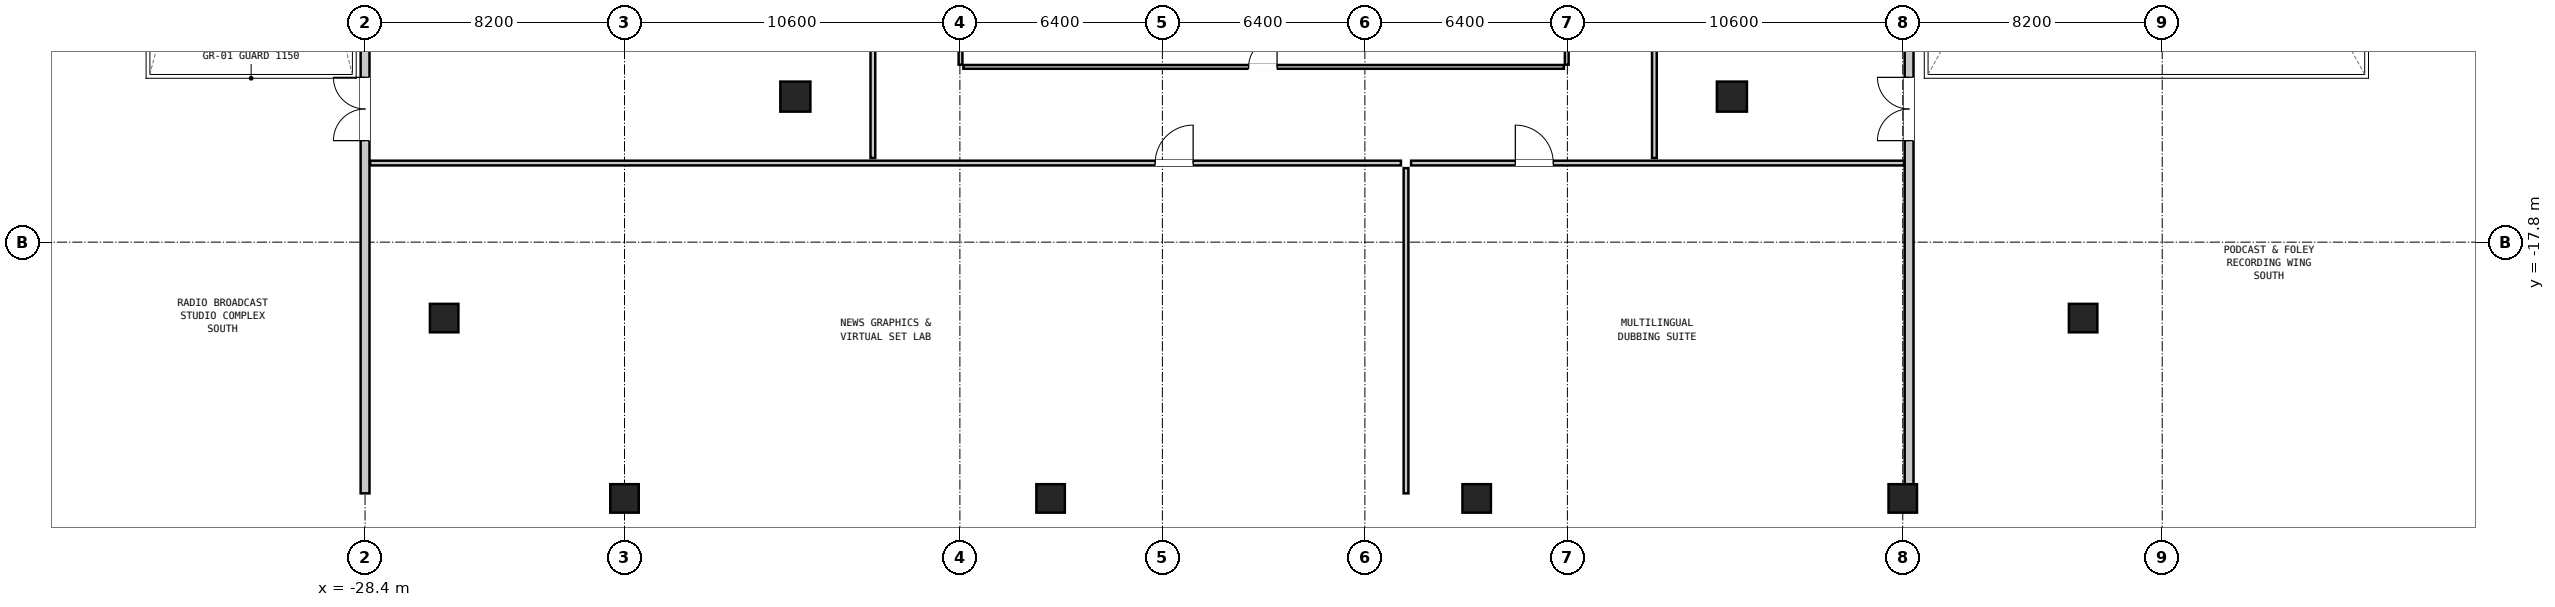
"""IFC4 building model, lengths in metres.
Left out: names, types, materials, properties, quantities, classifications, styles, units other than length and angle.
Written with IfcOpenShell. Run it as: python <this file> out.ifc"""

import sys

from ifc_helpers import new_model, si_unit, direction, frame, frame_2d, origin, origin_2d, place, context, subcontext, project, spatial, rectangle, hollow_rectangle, extrude, element, fill, save


model = new_model("IFC4")
c1 = context("Model", 3, precision=1e-05, world=origin(), true_north=direction((0.0, 1.0)))
c2 = subcontext(c1, "Body", "Model", "MODEL_VIEW")
j1 = project(units=[si_unit("LENGTHUNIT", "METRE"), si_unit("PLANEANGLEUNIT", "RADIAN")], contexts=[c1])
p1 = place(None, origin())
s1 = spatial("IfcSite", under=j1, at=p1, CompositionType="ELEMENT")
p2 = place(p1, origin())
s2 = spatial("IfcBuilding", under=s1, at=p2, CompositionType="ELEMENT")
p3 = place(p2, frame((0.0, 0.0, 17.7)))
s3 = spatial("IfcBuildingStorey", under=s2, at=p3, CompositionType="ELEMENT", Elevation=17.7)
for number, where, z_axis, x_axis in (
    (1, (-14.8, -13.2, 0.0), (0.0, 0.0, 1.0), (1.0, 0.0, 0.0)),
    (2, (14.8, -13.2, 0.0), (0.0, 0.0, 1.0), (1.0, 0.0, 0.0)),
):
    element("IfcColumn", number, at=place(p3, frame(where, z_axis=z_axis, x_axis=x_axis)), inside=s3, PredefinedType="COLUMN", context=c2, shape_type="SweptSolid", body=[
        extrude(hollow_rectangle(XDim=0.95, YDim=0.95, WallThickness=0.06, at=origin_2d()), origin(), (0.0, 0.0, 1.0), 4.2),
    ])
for number, where, z_axis, x_axis in (
    (3, (-20.2, -25.9, 0.0), (0.0, 0.0, 1.0), (1.0, 0.0, 0.0)),
    (4, (-6.733, -25.9, 0.0), (0.0, 0.0, 1.0), (1.0, 0.0, 0.0)),
    (5, (6.733, -25.9, 0.0), (0.0, 0.0, 1.0), (1.0, 0.0, 0.0)),
    (6, (20.2, -25.9, 0.0), (0.0, 0.0, 1.0), (1.0, 0.0, 0.0)),
    (7, (25.9, -20.2, 0.0), (0.0, 0.0, 1.0), (0.0, 1.0, 0.0)),
    (8, (-25.9, -20.2, 0.0), (0.0, 0.0, 1.0), (0.0, 1.0, 0.0)),
):
    element("IfcColumn", number, at=place(p3, frame(where, z_axis=z_axis, x_axis=x_axis)), inside=s3, PredefinedType="COLUMN", context=c2, shape_type="SweptSolid", body=[
        extrude(hollow_rectangle(XDim=0.9, YDim=0.9, WallThickness=0.055, at=origin_2d()), origin(), (0.0, 0.0, 1.0), 4.2),
    ])
p4 = place(p3, frame((-28.4, -25.74, 0.0), z_axis=(0.0, 0.0, 1.0), x_axis=(0.0, 1.0, 0.0)))
e9 = element("IfcWall", 9, at=p4, inside=s3, PredefinedType="MOVABLE", context=c2, shape_type="SweptSolid", body=[
    extrude(rectangle(XDim=51.48, YDim=0.28, at=frame_2d((25.74, 0.0))), origin(), (0.0, 0.0, 1.0), 3.82),
])
p5 = place(p4, frame((11.149, 0.0, 0.0)))
e10 = element("IfcOpeningElement", 10, at=p5, cuts=e9, PredefinedType="OPENING", context=c2, shape_type="SweptSolid", body=[
    extrude(rectangle(XDim=2.0, YDim=2.14, at=frame_2d((1.0, 1.07))), frame((0.0, 0.152, 0.0), z_axis=(0.0, -1.0, 0.0), x_axis=(1.0, 0.0, 0.0)), (0.0, 0.0, 1.0), 0.304),
])
p6 = place(p4, frame((38.64, 0.0, 0.0)))
e11 = element("IfcOpeningElement", 11, at=p6, cuts=e9, PredefinedType="OPENING", context=c2, shape_type="SweptSolid", body=[
    extrude(rectangle(XDim=2.0, YDim=2.14, at=frame_2d((1.0, 1.07))), frame((0.0, 0.152, 0.0), z_axis=(0.0, -1.0, 0.0), x_axis=(1.0, 0.0, 0.0)), (0.0, 0.0, 1.0), 0.304),
])
p7 = place(p3, frame((20.4, -25.74, 0.0), z_axis=(0.0, 0.0, 1.0), x_axis=(0.0, 1.0, 0.0)))
e12 = element("IfcWall", 12, at=p7, inside=s3, PredefinedType="MOVABLE", context=c2, shape_type="SweptSolid", body=[
    extrude(rectangle(XDim=51.48, YDim=0.28, at=frame_2d((25.74, 0.0))), origin(), (0.0, 0.0, 1.0), 3.193),
])
p8 = place(p7, frame((11.149, 0.0, 0.0)))
e13 = element("IfcOpeningElement", 13, at=p8, cuts=e12, PredefinedType="OPENING", context=c2, shape_type="SweptSolid", body=[
    extrude(rectangle(XDim=2.0, YDim=2.14, at=frame_2d((1.0, 1.07))), frame((0.0, 0.152, 0.0), z_axis=(0.0, -1.0, 0.0), x_axis=(1.0, 0.0, 0.0)), (0.0, 0.0, 1.0), 0.304),
])
p9 = place(p7, frame((38.64, 0.0, 0.0)))
e14 = element("IfcOpeningElement", 14, at=p9, cuts=e12, PredefinedType="OPENING", context=c2, shape_type="SweptSolid", body=[
    extrude(rectangle(XDim=2.0, YDim=2.14, at=frame_2d((1.0, 1.07))), frame((0.0, 0.152, 0.0), z_axis=(0.0, -1.0, 0.0), x_axis=(1.0, 0.0, 0.0)), (0.0, 0.0, 1.0), 0.304),
])
p10 = place(p3, frame((-28.24, -15.3, 0.0), z_axis=(0.0, 0.0, 1.0), x_axis=(1.0, 0.0, 0.0)))
e15 = element("IfcWall", 15, at=p10, inside=s3, PredefinedType="PARTITIONING", context=c2, shape_type="SweptSolid", body=[
    extrude(rectangle(XDim=32.58, YDim=0.15, at=frame_2d((16.29, 0.0))), origin(), (0.0, 0.0, 1.0), 3.82),
])
p11 = place(p10, frame((24.812, 0.0, 0.0)))
e16 = element("IfcOpeningElement", 16, at=p11, cuts=e15, PredefinedType="OPENING", context=c2, shape_type="SweptSolid", body=[
    extrude(rectangle(XDim=1.2, YDim=2.1, at=frame_2d((0.6, 1.05))), frame((0.0, 0.087, 0.0), z_axis=(0.0, -1.0, 0.0), x_axis=(1.0, 0.0, 0.0)), (0.0, 0.0, 1.0), 0.174),
])
p12 = place(p3, frame((4.66, -15.3, 0.0), z_axis=(0.0, 0.0, 1.0), x_axis=(1.0, 0.0, 0.0)))
e17 = element("IfcWall", 17, at=p12, inside=s3, PredefinedType="PARTITIONING", context=c2, shape_type="SweptSolid", body=[
    extrude(rectangle(XDim=15.58, YDim=0.15, at=frame_2d((7.79, 0.0))), origin(), (0.0, 0.0, 1.0), 3.82),
])
p13 = place(p12, frame((3.295, 0.0, 0.0)))
e18 = element("IfcOpeningElement", 18, at=p13, cuts=e17, PredefinedType="OPENING", context=c2, shape_type="SweptSolid", body=[
    extrude(rectangle(XDim=1.2, YDim=2.1, at=frame_2d((0.6, 1.05))), frame((0.0, 0.087, 0.0), z_axis=(0.0, -1.0, 0.0), x_axis=(1.0, 0.0, 0.0)), (0.0, 0.0, 1.0), 0.174),
])
p14 = place(p3, frame((4.5, -25.74, 0.0), z_axis=(0.0, 0.0, 1.0), x_axis=(0.0, 1.0, 0.0)))
e19 = element("IfcWall", 19, at=p14, inside=s3, PredefinedType="PARTITIONING", context=c2, shape_type="SweptSolid", body=[
    extrude(rectangle(XDim=10.28, YDim=0.15, at=frame_2d((5.14, 0.0))), origin(), (0.0, 0.0, 1.0), 3.82),
])
p15 = place(p3, frame((-12.35, -15.14, 0.0), z_axis=(0.0, 0.0, 1.0), x_axis=(0.0, 1.0, 0.0)))
e20 = element("IfcWall", 20, at=p15, inside=s3, PredefinedType="PARTITIONING", context=c2, shape_type="SweptSolid", body=[
    extrude(rectangle(XDim=12.58, YDim=0.15, at=frame_2d((6.29, 0.0))), origin(), (0.0, 0.0, 1.0), 3.82),
])
p16 = place(p15, frame((5.815, 0.0, 0.0)))
e21 = element("IfcOpeningElement", 21, at=p16, cuts=e20, PredefinedType="OPENING", context=c2, shape_type="SweptSolid", body=[
    extrude(rectangle(XDim=0.95, YDim=2.1, at=frame_2d((0.475, 1.05))), frame((0.0, 0.087, 0.0), z_axis=(0.0, -1.0, 0.0), x_axis=(1.0, 0.0, 0.0)), (0.0, 0.0, 1.0), 0.174),
])
p17 = place(p3, frame((12.35, -15.14, 0.0), z_axis=(0.0, 0.0, 1.0), x_axis=(0.0, 1.0, 0.0)))
e22 = element("IfcWall", 22, at=p17, inside=s3, PredefinedType="PARTITIONING", context=c2, shape_type="SweptSolid", body=[
    extrude(rectangle(XDim=12.6, YDim=0.15, at=frame_2d((6.3, 0.0))), origin(), (0.0, 0.0, 1.0), 3.82),
])
p18 = place(p17, frame((5.825, 0.0, 0.0)))
e23 = element("IfcOpeningElement", 23, at=p18, cuts=e22, PredefinedType="OPENING", context=c2, shape_type="SweptSolid", body=[
    extrude(rectangle(XDim=0.95, YDim=2.1, at=frame_2d((0.475, 1.05))), frame((0.0, 0.087, 0.0), z_axis=(0.0, -1.0, 0.0), x_axis=(1.0, 0.0, 0.0)), (0.0, 0.0, 1.0), 0.174),
])
p19 = place(p3, frame((-9.49, -12.26, 0.0), z_axis=(0.0, 0.0, 1.0), x_axis=(1.0, 0.0, 0.0)))
e24 = element("IfcWall", 24, at=p19, inside=s3, PredefinedType="PARTITIONING", context=c2, shape_type="SweptSolid", body=[
    extrude(rectangle(XDim=18.98, YDim=0.12, at=frame_2d((9.49, 0.0))), origin(), (0.0, 0.0, 1.0), 3.82),
])
p20 = place(p19, frame((9.015, 0.0, 0.0)))
e25 = element("IfcOpeningElement", 25, at=p20, cuts=e24, PredefinedType="OPENING", context=c2, shape_type="SweptSolid", body=[
    extrude(rectangle(XDim=0.9, YDim=2.05, at=frame_2d((0.45, 1.025))), frame((0.0, 0.072, 0.0), z_axis=(0.0, -1.0, 0.0), x_axis=(1.0, 0.0, 0.0)), (0.0, 0.0, 1.0), 0.144),
])
for number, where, z_axis, x_axis in (
    (26, (-9.58, -12.19, 0.0), (0.0, 0.0, 1.0), (0.0, 1.0, 0.0)),
    (27, (9.58, -12.19, 0.0), (0.0, 0.0, 1.0), (0.0, 1.0, 0.0)),
):
    element("IfcWall", number, at=place(p3, frame(where, z_axis=z_axis, x_axis=x_axis)), inside=s3, PredefinedType="PARTITIONING", context=c2, shape_type="SweptSolid", body=[
        extrude(rectangle(XDim=3.08, YDim=0.12, at=frame_2d((1.54, 0.0))), origin(), (0.0, 0.0, 1.0), 3.82),
    ])
p21 = place(p5, origin())
e28 = element("IfcDoor", 28, at=p21, inside=s3, OperationType="DOUBLE_DOOR_SINGLE_SWING", PredefinedType="DOOR", context=c2, shape_type="SweptSolid", body=[
    extrude(rectangle(XDim=2.0, YDim=2.14, at=frame_2d((1.0, 1.07))), frame((0.0, 0.025, 0.0), z_axis=(0.0, -1.0, 0.0), x_axis=(1.0, 0.0, 0.0)), (0.0, 0.0, 1.0), 0.05),
])
fill(e10, e28)
p22 = place(p8, origin())
e29 = element("IfcDoor", 29, at=p22, inside=s3, OperationType="DOUBLE_DOOR_SINGLE_SWING", PredefinedType="DOOR", context=c2, shape_type="SweptSolid", body=[
    extrude(rectangle(XDim=2.0, YDim=2.14, at=frame_2d((1.0, 1.07))), frame((0.0, 0.025, 0.0), z_axis=(0.0, -1.0, 0.0), x_axis=(1.0, 0.0, 0.0)), (0.0, 0.0, 1.0), 0.05),
])
fill(e13, e29)
p23 = place(p11, origin())
e30 = element("IfcDoor", 30, at=p23, inside=s3, OperationType="SINGLE_SWING_RIGHT", PredefinedType="DOOR", context=c2, shape_type="SweptSolid", body=[
    extrude(rectangle(XDim=1.2, YDim=2.1, at=frame_2d((0.6, 1.05))), frame((0.0, 0.025, 0.0), z_axis=(0.0, -1.0, 0.0), x_axis=(1.0, 0.0, 0.0)), (0.0, 0.0, 1.0), 0.05),
])
fill(e16, e30)
p24 = place(p13, origin())
e31 = element("IfcDoor", 31, at=p24, inside=s3, OperationType="SINGLE_SWING_LEFT", PredefinedType="DOOR", context=c2, shape_type="SweptSolid", body=[
    extrude(rectangle(XDim=1.2, YDim=2.1, at=frame_2d((0.6, 1.05))), frame((0.0, 0.025, 0.0), z_axis=(0.0, -1.0, 0.0), x_axis=(1.0, 0.0, 0.0)), (0.0, 0.0, 1.0), 0.05),
])
fill(e18, e31)
p25 = place(p20, origin())
e32 = element("IfcDoor", 32, at=p25, inside=s3, OperationType="SINGLE_SWING_RIGHT", PredefinedType="DOOR", context=c2, shape_type="SweptSolid", body=[
    extrude(rectangle(XDim=0.9, YDim=2.05, at=frame_2d((0.45, 1.025))), frame((0.0, 0.025, 0.0), z_axis=(0.0, -1.0, 0.0), x_axis=(1.0, 0.0, 0.0)), (0.0, 0.0, 1.0), 0.05),
])
fill(e25, e32)
save(model, sys.argv[1])
